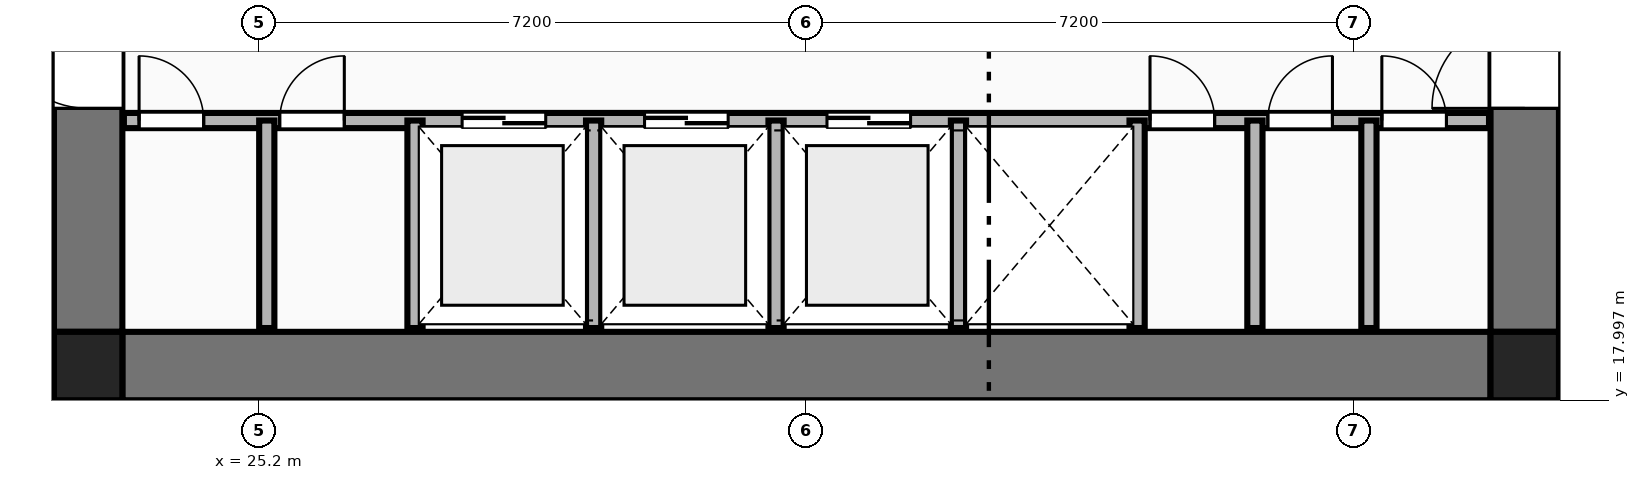
"""IFC4 building model, lengths in metres.
Left out: names, types, materials, properties, quantities, classifications, styles, units other than length and angle.
Written with IfcOpenShell. Run it as: python <this file> out.ifc"""

import sys

from ifc_helpers import new_model, si_unit, direction, frame, frame_2d, origin, origin_2d, place, context, subcontext, project, spatial, rectangle, extrude, element, fill, save


model = new_model("IFC4")
c1 = context("Model", 3, precision=1e-05, world=origin(), true_north=direction((0.0, 1.0)))
c2 = subcontext(c1, "Body", "Model", "MODEL_VIEW")
j1 = project(units=[si_unit("LENGTHUNIT", "METRE"), si_unit("PLANEANGLEUNIT", "RADIAN")], contexts=[c1])
p1 = place(None, origin())
s1 = spatial("IfcSite", under=j1, at=p1, CompositionType="ELEMENT")
p2 = place(p1, origin())
s2 = spatial("IfcBuilding", under=s1, at=p2, CompositionType="ELEMENT")
p3 = place(p2, frame((0.0, 0.0, 67.5)))
s3 = spatial("IfcBuildingStorey", under=s2, at=p3, CompositionType="ELEMENT", Elevation=67.5)
for number, where, z_axis, x_axis in (
    (1, (22.95, 18.45, 0.0), (0.0, 0.0, 1.0), (1.0, 0.0, 0.0)),
    (2, (41.85, 18.45, 0.0), (0.0, 0.0, 1.0), (1.0, 0.0, 0.0)),
):
    element("IfcColumn", number, at=place(p3, frame(where, z_axis=z_axis, x_axis=x_axis)), inside=s3, PredefinedType="COLUMN", context=c2, shape_type="SweptSolid", body=[
        extrude(rectangle(XDim=0.9, YDim=0.9, at=origin_2d()), origin(), (0.0, 0.0, 1.0), 3.55),
    ])
p4 = place(p3, frame((23.4, 18.45, 0.0), z_axis=(0.0, 0.0, 1.0), x_axis=(1.0, 0.0, 0.0)))
e3 = element("IfcWall", 3, at=p4, inside=s3, PredefinedType="SHEAR", context=c2, shape_type="SweptSolid", body=[
    extrude(rectangle(XDim=18.0, YDim=0.9, at=frame_2d((9.0, 0.0))), origin(), (0.0, 0.0, 1.0), 3.33),
])
p5 = place(p3, frame((22.95, 18.9, 0.0), z_axis=(0.0, 0.0, 1.0), x_axis=(0.0, 1.0, 0.0)))
e4 = element("IfcWall", 4, at=p5, inside=s3, PredefinedType="SHEAR", context=c2, shape_type="SweptSolid", body=[
    extrude(rectangle(XDim=14.0, YDim=0.9, at=frame_2d((7.0, 0.0))), origin(), (0.0, 0.0, 1.0), 3.33),
])
p6 = place(p5, frame((2.94, 0.0, 0.0)))
e5 = element("IfcOpeningElement", 5, at=p6, cuts=e4, PredefinedType="OPENING", context=c2, shape_type="SweptSolid", body=[
    extrude(rectangle(XDim=1.22, YDim=2.25, at=frame_2d((0.61, 1.125))), frame((0.0, 0.46, 0.0), z_axis=(0.0, -1.0, 0.0), x_axis=(1.0, 0.0, 0.0)), (0.0, 0.0, 1.0), 0.92),
])
p7 = place(p3, frame((41.85, 18.9, 0.0), z_axis=(0.0, 0.0, 1.0), x_axis=(0.0, 1.0, 0.0)))
e6 = element("IfcWall", 6, at=p7, inside=s3, PredefinedType="SHEAR", context=c2, shape_type="SweptSolid", body=[
    extrude(rectangle(XDim=14.0, YDim=0.9, at=frame_2d((7.0, 0.0))), origin(), (0.0, 0.0, 1.0), 3.33),
])
p8 = place(p7, frame((2.94, 0.0, 0.0)))
e7 = element("IfcOpeningElement", 7, at=p8, cuts=e6, PredefinedType="OPENING", context=c2, shape_type="SweptSolid", body=[
    extrude(rectangle(XDim=1.22, YDim=2.25, at=frame_2d((0.61, 1.125))), frame((0.0, 0.46, 0.0), z_axis=(0.0, -1.0, 0.0), x_axis=(1.0, 0.0, 0.0)), (0.0, 0.0, 1.0), 0.92),
])
p9 = place(p3, frame((23.42, 21.68, 0.0), z_axis=(0.0, 0.0, 1.0), x_axis=(1.0, 0.0, 0.0)))
e8 = element("IfcWall", 8, at=p9, inside=s3, PredefinedType="PLUMBINGWALL", context=c2, shape_type="SweptSolid", body=[
    extrude(rectangle(XDim=17.96, YDim=0.2, at=frame_2d((8.98, 0.0))), origin(), (0.0, 0.0, 1.0), 3.33),
])
p10 = place(p9, frame((4.45, 0.0, 0.0)))
e9 = element("IfcOpeningElement", 9, at=p10, cuts=e8, PredefinedType="OPENING", context=c2, shape_type="SweptSolid", body=[
    extrude(rectangle(XDim=1.1, YDim=2.2, at=frame_2d((0.55, 1.1))), frame((0.0, 0.11, 0.0), z_axis=(0.0, -1.0, 0.0), x_axis=(1.0, 0.0, 0.0)), (0.0, 0.0, 1.0), 0.22),
])
p11 = place(p9, frame((6.85, 0.0, 0.0)))
e10 = element("IfcOpeningElement", 10, at=p11, cuts=e8, PredefinedType="OPENING", context=c2, shape_type="SweptSolid", body=[
    extrude(rectangle(XDim=1.1, YDim=2.2, at=frame_2d((0.55, 1.1))), frame((0.0, 0.11, 0.0), z_axis=(0.0, -1.0, 0.0), x_axis=(1.0, 0.0, 0.0)), (0.0, 0.0, 1.0), 0.22),
])
p12 = place(p9, frame((9.25, 0.0, 0.0)))
e11 = element("IfcOpeningElement", 11, at=p12, cuts=e8, PredefinedType="OPENING", context=c2, shape_type="SweptSolid", body=[
    extrude(rectangle(XDim=1.1, YDim=2.2, at=frame_2d((0.55, 1.1))), frame((0.0, 0.11, 0.0), z_axis=(0.0, -1.0, 0.0), x_axis=(1.0, 0.0, 0.0)), (0.0, 0.0, 1.0), 0.22),
])
p13 = place(p9, frame((0.2, 0.0, 0.0)))
e12 = element("IfcOpeningElement", 12, at=p13, cuts=e8, PredefinedType="OPENING", context=c2, shape_type="SweptSolid", body=[
    extrude(rectangle(XDim=0.85, YDim=2.05, at=frame_2d((0.425, 1.025))), frame((0.0, 0.11, 0.0), z_axis=(0.0, -1.0, 0.0), x_axis=(1.0, 0.0, 0.0)), (0.0, 0.0, 1.0), 0.22),
])
p14 = place(p9, frame((2.05, 0.0, 0.0)))
e13 = element("IfcOpeningElement", 13, at=p14, cuts=e8, PredefinedType="OPENING", context=c2, shape_type="SweptSolid", body=[
    extrude(rectangle(XDim=0.85, YDim=2.05, at=frame_2d((0.425, 1.025))), frame((0.0, 0.11, 0.0), z_axis=(0.0, -1.0, 0.0), x_axis=(1.0, 0.0, 0.0)), (0.0, 0.0, 1.0), 0.22),
])
p15 = place(p9, frame((13.5, 0.0, 0.0)))
e14 = element("IfcOpeningElement", 14, at=p15, cuts=e8, PredefinedType="OPENING", context=c2, shape_type="SweptSolid", body=[
    extrude(rectangle(XDim=0.85, YDim=2.05, at=frame_2d((0.425, 1.025))), frame((0.0, 0.11, 0.0), z_axis=(0.0, -1.0, 0.0), x_axis=(1.0, 0.0, 0.0)), (0.0, 0.0, 1.0), 0.22),
])
p16 = place(p9, frame((15.05, 0.0, 0.0)))
e15 = element("IfcOpeningElement", 15, at=p16, cuts=e8, PredefinedType="OPENING", context=c2, shape_type="SweptSolid", body=[
    extrude(rectangle(XDim=0.85, YDim=2.05, at=frame_2d((0.425, 1.025))), frame((0.0, 0.11, 0.0), z_axis=(0.0, -1.0, 0.0), x_axis=(1.0, 0.0, 0.0)), (0.0, 0.0, 1.0), 0.22),
])
p17 = place(p9, frame((16.55, 0.0, 0.0)))
e16 = element("IfcOpeningElement", 16, at=p17, cuts=e8, PredefinedType="OPENING", context=c2, shape_type="SweptSolid", body=[
    extrude(rectangle(XDim=0.85, YDim=2.05, at=frame_2d((0.425, 1.025))), frame((0.0, 0.11, 0.0), z_axis=(0.0, -1.0, 0.0), x_axis=(1.0, 0.0, 0.0)), (0.0, 0.0, 1.0), 0.22),
])
for number, where, z_axis, x_axis in (
    (17, (27.25, 18.95, 0.0), (0.0, 0.0, 1.0), (0.0, 1.0, 0.0)),
    (18, (29.6, 18.95, 0.0), (0.0, 0.0, 1.0), (0.0, 1.0, 0.0)),
    (19, (32.0, 18.95, 0.0), (0.0, 0.0, 1.0), (0.0, 1.0, 0.0)),
    (20, (34.4, 18.95, 0.0), (0.0, 0.0, 1.0), (0.0, 1.0, 0.0)),
    (21, (36.75, 18.95, 0.0), (0.0, 0.0, 1.0), (0.0, 1.0, 0.0)),
    (22, (25.3, 18.95, 0.0), (0.0, 0.0, 1.0), (0.0, 1.0, 0.0)),
    (23, (38.3, 18.95, 0.0), (0.0, 0.0, 1.0), (0.0, 1.0, 0.0)),
    (24, (39.8, 18.95, 0.0), (0.0, 0.0, 1.0), (0.0, 1.0, 0.0)),
):
    element("IfcWall", number, at=place(p3, frame(where, z_axis=z_axis, x_axis=x_axis)), inside=s3, PredefinedType="PLUMBINGWALL", context=c2, shape_type="SweptSolid", body=[
        extrude(rectangle(XDim=2.73, YDim=0.2, at=frame_2d((1.365, 0.0))), origin(), (0.0, 0.0, 1.0), 3.33),
    ])
p18 = place(p6, origin())
e25 = element("IfcDoor", 25, at=p18, inside=s3, OperationType="SINGLE_SWING_RIGHT", PredefinedType="DOOR", context=c2, shape_type="SweptSolid", body=[
    extrude(rectangle(XDim=1.22, YDim=2.25, at=frame_2d((0.61, 1.125))), frame((0.0, 0.025, 0.0), z_axis=(0.0, -1.0, 0.0), x_axis=(1.0, 0.0, 0.0)), (0.0, 0.0, 1.0), 0.05),
])
fill(e5, e25)
p19 = place(p8, origin())
e26 = element("IfcDoor", 26, at=p19, inside=s3, OperationType="SINGLE_SWING_LEFT", PredefinedType="DOOR", context=c2, shape_type="SweptSolid", body=[
    extrude(rectangle(XDim=1.22, YDim=2.25, at=frame_2d((0.61, 1.125))), frame((0.0, 0.025, 0.0), z_axis=(0.0, -1.0, 0.0), x_axis=(1.0, 0.0, 0.0)), (0.0, 0.0, 1.0), 0.05),
])
fill(e7, e26)
p20 = place(p10, origin())
e27 = element("IfcDoor", 27, at=p20, inside=s3, OperationType="DOUBLE_DOOR_SLIDING", PredefinedType="DOOR", context=c2, shape_type="SweptSolid", body=[
    extrude(rectangle(XDim=1.1, YDim=2.2, at=frame_2d((0.55, 1.1))), frame((0.0, 0.025, 0.0), z_axis=(0.0, -1.0, 0.0), x_axis=(1.0, 0.0, 0.0)), (0.0, 0.0, 1.0), 0.05),
])
fill(e9, e27)
p21 = place(p11, origin())
e28 = element("IfcDoor", 28, at=p21, inside=s3, OperationType="DOUBLE_DOOR_SLIDING", PredefinedType="DOOR", context=c2, shape_type="SweptSolid", body=[
    extrude(rectangle(XDim=1.1, YDim=2.2, at=frame_2d((0.55, 1.1))), frame((0.0, 0.025, 0.0), z_axis=(0.0, -1.0, 0.0), x_axis=(1.0, 0.0, 0.0)), (0.0, 0.0, 1.0), 0.05),
])
fill(e10, e28)
p22 = place(p12, origin())
e29 = element("IfcDoor", 29, at=p22, inside=s3, OperationType="DOUBLE_DOOR_SLIDING", PredefinedType="DOOR", context=c2, shape_type="SweptSolid", body=[
    extrude(rectangle(XDim=1.1, YDim=2.2, at=frame_2d((0.55, 1.1))), frame((0.0, 0.025, 0.0), z_axis=(0.0, -1.0, 0.0), x_axis=(1.0, 0.0, 0.0)), (0.0, 0.0, 1.0), 0.05),
])
fill(e11, e29)
p23 = place(p13, origin())
e30 = element("IfcDoor", 30, at=p23, inside=s3, OperationType="SINGLE_SWING_LEFT", PredefinedType="DOOR", context=c2, shape_type="SweptSolid", body=[
    extrude(rectangle(XDim=0.85, YDim=2.05, at=frame_2d((0.425, 1.025))), frame((0.0, 0.025, 0.0), z_axis=(0.0, -1.0, 0.0), x_axis=(1.0, 0.0, 0.0)), (0.0, 0.0, 1.0), 0.05),
])
fill(e12, e30)
p24 = place(p14, origin())
e31 = element("IfcDoor", 31, at=p24, inside=s3, OperationType="SINGLE_SWING_RIGHT", PredefinedType="DOOR", context=c2, shape_type="SweptSolid", body=[
    extrude(rectangle(XDim=0.85, YDim=2.05, at=frame_2d((0.425, 1.025))), frame((0.0, 0.025, 0.0), z_axis=(0.0, -1.0, 0.0), x_axis=(1.0, 0.0, 0.0)), (0.0, 0.0, 1.0), 0.05),
])
fill(e13, e31)
p25 = place(p15, origin())
e32 = element("IfcDoor", 32, at=p25, inside=s3, OperationType="SINGLE_SWING_LEFT", PredefinedType="DOOR", context=c2, shape_type="SweptSolid", body=[
    extrude(rectangle(XDim=0.85, YDim=2.05, at=frame_2d((0.425, 1.025))), frame((0.0, 0.025, 0.0), z_axis=(0.0, -1.0, 0.0), x_axis=(1.0, 0.0, 0.0)), (0.0, 0.0, 1.0), 0.05),
])
fill(e14, e32)
p26 = place(p16, origin())
e33 = element("IfcDoor", 33, at=p26, inside=s3, OperationType="SINGLE_SWING_RIGHT", PredefinedType="DOOR", context=c2, shape_type="SweptSolid", body=[
    extrude(rectangle(XDim=0.85, YDim=2.05, at=frame_2d((0.425, 1.025))), frame((0.0, 0.025, 0.0), z_axis=(0.0, -1.0, 0.0), x_axis=(1.0, 0.0, 0.0)), (0.0, 0.0, 1.0), 0.05),
])
fill(e15, e33)
p27 = place(p17, origin())
e34 = element("IfcDoor", 34, at=p27, inside=s3, OperationType="SINGLE_SWING_LEFT", PredefinedType="DOOR", context=c2, shape_type="SweptSolid", body=[
    extrude(rectangle(XDim=0.85, YDim=2.05, at=frame_2d((0.425, 1.025))), frame((0.0, 0.025, 0.0), z_axis=(0.0, -1.0, 0.0), x_axis=(1.0, 0.0, 0.0)), (0.0, 0.0, 1.0), 0.05),
])
fill(e16, e34)
save(model, sys.argv[1])
